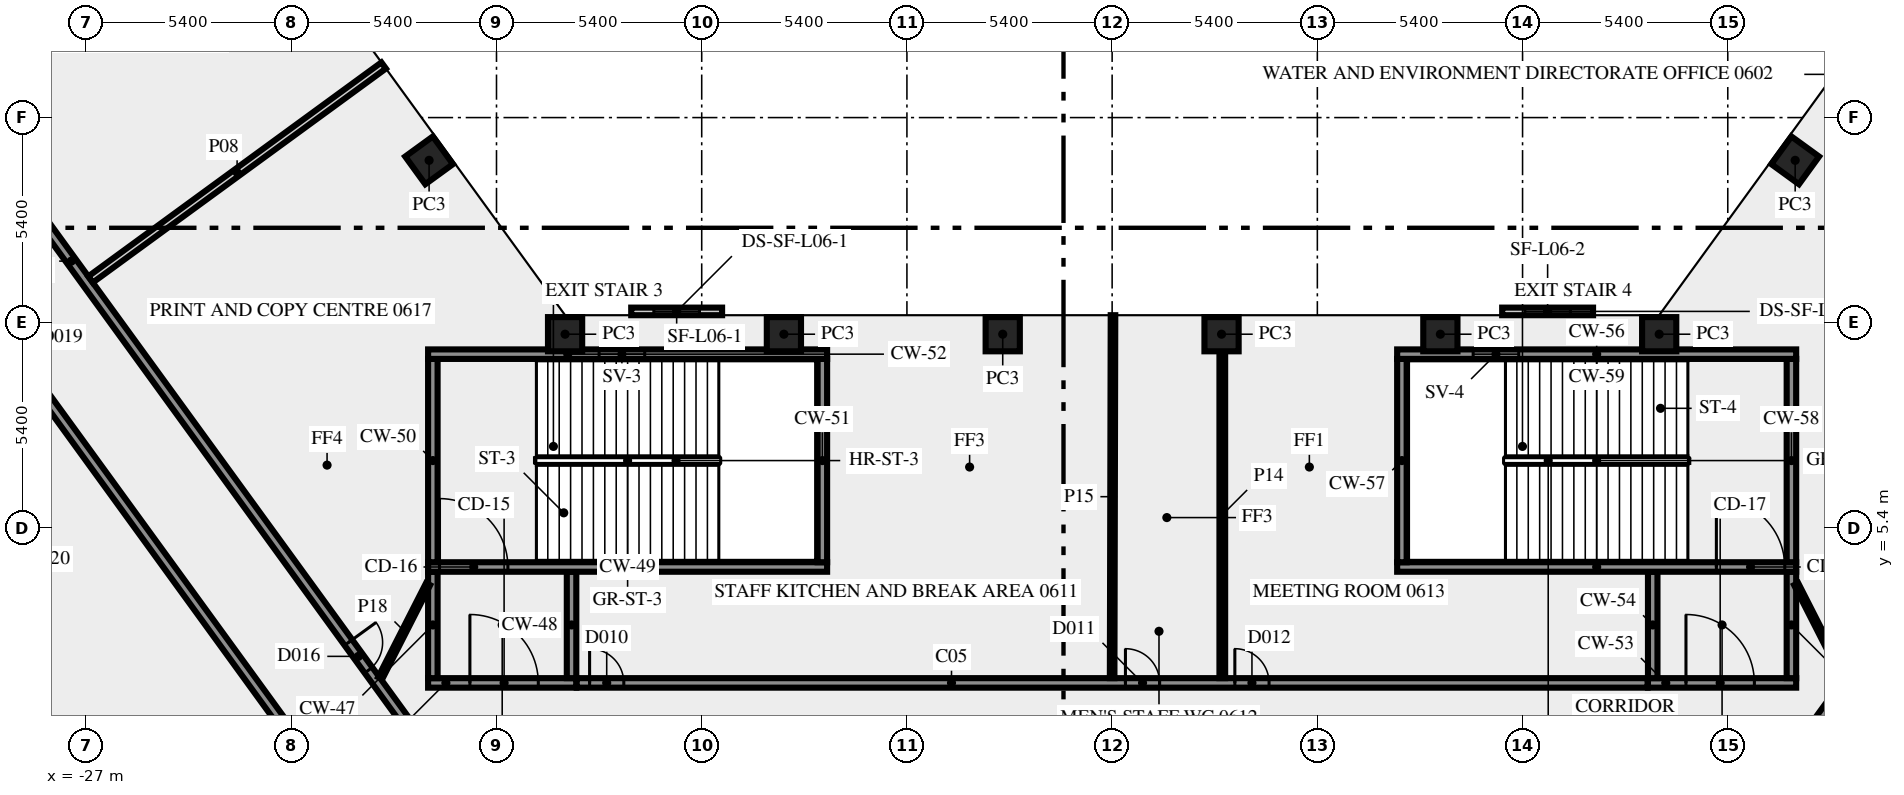
"""IFC4 building model, lengths in metres.
Left out: names, types, materials, properties, quantities, classifications, styles, units other than length and angle.
Written with IfcOpenShell. Run it as: python <this file> out.ifc"""

import sys

from ifc_helpers import new_model, si_unit, direction, frame, frame_2d, origin, origin_2d, place, context, subcontext, project, spatial, rectangle, extrude, element, fill, save


model = new_model("IFC4")
c1 = context("Model", 3, precision=1e-05, world=origin(), true_north=direction((0.0, 1.0)))
c2 = subcontext(c1, "Body", "Model", "MODEL_VIEW")
j1 = project(units=[si_unit("LENGTHUNIT", "METRE"), si_unit("PLANEANGLEUNIT", "RADIAN")], contexts=[c1])
p1 = place(None, origin())
s1 = spatial("IfcSite", under=j1, at=p1, CompositionType="ELEMENT")
p2 = place(p1, origin())
s2 = spatial("IfcBuilding", under=s1, at=p2, CompositionType="ELEMENT")
p3 = place(p2, frame((0.0, 0.0, 31.0)))
s3 = spatial("IfcBuildingStorey", under=s2, at=p3, CompositionType="ELEMENT", Elevation=31.0)
for number, where, z_axis, x_axis in (
    (1, (-17.974, 15.075, 0.0), (0.0, 0.0, 1.0), (-0.588, 0.809, 0.0)),
    (2, (17.974, 15.075, 0.0), (0.0, 0.0, 1.0), (-0.588, -0.809, 0.0)),
    (3, (14.395, 10.5, 0.0), (0.0, 0.0, 1.0), (-1.0, 0.0, 0.0)),
    (4, (8.637, 10.5, 0.0), (0.0, 0.0, 1.0), (-1.0, 0.0, 0.0)),
    (5, (2.879, 10.5, 0.0), (0.0, 0.0, 1.0), (-1.0, 0.0, 0.0)),
    (6, (-2.879, 10.5, 0.0), (0.0, 0.0, 1.0), (-1.0, 0.0, 0.0)),
    (7, (-8.637, 10.5, 0.0), (0.0, 0.0, 1.0), (-1.0, 0.0, 0.0)),
    (8, (-14.395, 10.5, 0.0), (0.0, 0.0, 1.0), (-1.0, 0.0, 0.0)),
):
    element("IfcColumn", number, at=place(p3, frame(where, z_axis=z_axis, x_axis=x_axis)), inside=s3, PredefinedType="COLUMN", context=c2, shape_type="SweptSolid", body=[
        extrude(rectangle(XDim=0.9, YDim=0.9, at=origin_2d()), origin(), (0.0, 0.0, 1.0), 3.65),
    ])
p4 = place(p3, frame((12.655, 11.1, 0.0), z_axis=(0.0, 0.0, 1.0), x_axis=(-1.0, 0.0, 0.0)))
e9 = element("IfcWall", 9, at=p4, inside=s3, PredefinedType="SOLIDWALL", context=c2, shape_type="SweptSolid", body=[
    extrude(rectangle(XDim=2.392, YDim=0.2, at=frame_2d((1.196, 0.0))), origin(), (0.0, 0.0, 1.0), 3.65),
])
p5 = place(p4, frame((0.596, 0.0, 1.0)))
e10 = element("IfcOpeningElement", 10, at=p5, cuts=e9, PredefinedType="OPENING", context=c2, shape_type="SweptSolid", body=[
    extrude(rectangle(XDim=1.2, YDim=1.2, at=frame_2d((0.6, 0.6))), frame((0.0, 0.11, 0.0), z_axis=(0.0, -1.0, 0.0), x_axis=(1.0, 0.0, 0.0)), (0.0, 0.0, 1.0), 0.22),
])
p6 = place(p3, frame((-10.263, 11.1, 0.0), z_axis=(0.0, 0.0, 1.0), x_axis=(-1.0, 0.0, 0.0)))
e11 = element("IfcWall", 11, at=p6, inside=s3, PredefinedType="SOLIDWALL", context=c2, shape_type="SweptSolid", body=[
    extrude(rectangle(XDim=2.392, YDim=0.2, at=frame_2d((1.196, 0.0))), origin(), (0.0, 0.0, 1.0), 3.65),
])
p7 = place(p6, frame((0.596, 0.0, 1.0)))
e12 = element("IfcOpeningElement", 12, at=p7, cuts=e11, PredefinedType="OPENING", context=c2, shape_type="SweptSolid", body=[
    extrude(rectangle(XDim=1.2, YDim=1.2, at=frame_2d((0.6, 0.6))), frame((0.0, 0.11, 0.0), z_axis=(0.0, -1.0, 0.0), x_axis=(1.0, 0.0, 0.0)), (0.0, 0.0, 1.0), 0.22),
])
p8 = place(p3, frame((-18.0, 1.325, 0.0), z_axis=(0.0, 0.0, 1.0), x_axis=(1.0, 0.0, 0.0)))
e13 = element("IfcWall", 13, at=p8, inside=s3, PredefinedType="SHEAR", context=c2, shape_type="SweptSolid", body=[
    extrude(rectangle(XDim=3.9, YDim=0.25, at=frame_2d((1.95, 0.0))), origin(), (0.0, 0.0, 1.0), 3.65),
])
p9 = place(p8, frame((1.1, 0.0, 0.0)))
e14 = element("IfcOpeningElement", 14, at=p9, cuts=e13, PredefinedType="OPENING", context=c2, shape_type="SweptSolid", body=[
    extrude(rectangle(XDim=1.8, YDim=2.1, at=frame_2d((0.9, 1.05))), frame((0.0, 0.135, 0.0), z_axis=(0.0, -1.0, 0.0), x_axis=(1.0, 0.0, 0.0)), (0.0, 0.0, 1.0), 0.27),
])
for number, where, z_axis, x_axis in (
    (15, (-17.875, 1.45, 0.0), (0.0, 0.0, 1.0), (0.0, 1.0, 0.0)),
    (16, (-14.225, 1.45, 0.0), (0.0, 0.0, 1.0), (0.0, 1.0, 0.0)),
):
    element("IfcWall", number, at=place(p3, frame(where, z_axis=z_axis, x_axis=x_axis)), inside=s3, PredefinedType="SHEAR", context=c2, shape_type="SweptSolid", body=[
        extrude(rectangle(XDim=2.8, YDim=0.25, at=frame_2d((1.4, 0.0))), origin(), (0.0, 0.0, 1.0), 3.65),
    ])
p10 = place(p3, frame((-18.0, 4.375, 0.0), z_axis=(0.0, 0.0, 1.0), x_axis=(1.0, 0.0, 0.0)))
e17 = element("IfcWall", 17, at=p10, inside=s3, PredefinedType="SHEAR", context=c2, shape_type="SweptSolid", body=[
    extrude(rectangle(XDim=10.5, YDim=0.25, at=frame_2d((5.25, 0.0))), origin(), (0.0, 0.0, 1.0), 3.65),
])
p11 = place(p10, frame((0.3, 0.0, 0.0)))
e18 = element("IfcOpeningElement", 18, at=p11, cuts=e17, PredefinedType="OPENING", context=c2, shape_type="SweptSolid", body=[
    extrude(rectangle(XDim=1.8, YDim=2.1, at=frame_2d((0.9, 1.05))), frame((0.0, 0.135, 0.0), z_axis=(0.0, -1.0, 0.0), x_axis=(1.0, 0.0, 0.0)), (0.0, 0.0, 1.0), 0.27),
])
for number, where, z_axis, x_axis in (
    (19, (-17.875, 4.5, 0.0), (0.0, 0.0, 1.0), (0.0, 1.0, 0.0)),
    (20, (-7.625, 4.5, 0.0), (0.0, 0.0, 1.0), (0.0, 1.0, 0.0)),
):
    element("IfcWall", number, at=place(p3, frame(where, z_axis=z_axis, x_axis=x_axis)), inside=s3, PredefinedType="SHEAR", context=c2, shape_type="SweptSolid", body=[
        extrude(rectangle(XDim=5.35, YDim=0.25, at=frame_2d((2.675, 0.0))), origin(), (0.0, 0.0, 1.0), 3.65),
    ])
p12 = place(p3, frame((-18.0, 9.975, 0.0), z_axis=(0.0, 0.0, 1.0), x_axis=(1.0, 0.0, 0.0)))
e21 = element("IfcWall", 21, at=p12, inside=s3, PredefinedType="SHEAR", context=c2, shape_type="SweptSolid", body=[
    extrude(rectangle(XDim=10.5, YDim=0.25, at=frame_2d((5.25, 0.0))), origin(), (0.0, 0.0, 1.0), 3.65),
])
p13 = place(p12, frame((4.5, 0.0, 1.0)))
e22 = element("IfcOpeningElement", 22, at=p13, cuts=e21, PredefinedType="OPENING", context=c2, shape_type="SweptSolid", body=[
    extrude(rectangle(XDim=1.2, YDim=1.2, at=frame_2d((0.6, 0.6))), frame((0.0, 0.135, 0.0), z_axis=(0.0, -1.0, 0.0), x_axis=(1.0, 0.0, 0.0)), (0.0, 0.0, 1.0), 0.27),
])
p14 = place(p3, frame((14.1, 1.325, 0.0), z_axis=(0.0, 0.0, 1.0), x_axis=(1.0, 0.0, 0.0)))
e23 = element("IfcWall", 23, at=p14, inside=s3, PredefinedType="SHEAR", context=c2, shape_type="SweptSolid", body=[
    extrude(rectangle(XDim=3.9, YDim=0.25, at=frame_2d((1.95, 0.0))), origin(), (0.0, 0.0, 1.0), 3.65),
])
p15 = place(p14, frame((1.0, 0.0, 0.0)))
e24 = element("IfcOpeningElement", 24, at=p15, cuts=e23, PredefinedType="OPENING", context=c2, shape_type="SweptSolid", body=[
    extrude(rectangle(XDim=1.8, YDim=2.1, at=frame_2d((0.9, 1.05))), frame((0.0, 0.135, 0.0), z_axis=(0.0, -1.0, 0.0), x_axis=(1.0, 0.0, 0.0)), (0.0, 0.0, 1.0), 0.27),
])
for number, where, z_axis, x_axis in (
    (25, (14.225, 1.45, 0.0), (0.0, 0.0, 1.0), (0.0, 1.0, 0.0)),
    (26, (17.875, 1.45, 0.0), (0.0, 0.0, 1.0), (0.0, 1.0, 0.0)),
):
    element("IfcWall", number, at=place(p3, frame(where, z_axis=z_axis, x_axis=x_axis)), inside=s3, PredefinedType="SHEAR", context=c2, shape_type="SweptSolid", body=[
        extrude(rectangle(XDim=2.8, YDim=0.25, at=frame_2d((1.4, 0.0))), origin(), (0.0, 0.0, 1.0), 3.65),
    ])
p16 = place(p3, frame((7.5, 4.375, 0.0), z_axis=(0.0, 0.0, 1.0), x_axis=(1.0, 0.0, 0.0)))
e27 = element("IfcWall", 27, at=p16, inside=s3, PredefinedType="SHEAR", context=c2, shape_type="SweptSolid", body=[
    extrude(rectangle(XDim=10.5, YDim=0.25, at=frame_2d((5.25, 0.0))), origin(), (0.0, 0.0, 1.0), 3.65),
])
p17 = place(p16, frame((8.4, 0.0, 0.0)))
e28 = element("IfcOpeningElement", 28, at=p17, cuts=e27, PredefinedType="OPENING", context=c2, shape_type="SweptSolid", body=[
    extrude(rectangle(XDim=1.8, YDim=2.1, at=frame_2d((0.9, 1.05))), frame((0.0, 0.135, 0.0), z_axis=(0.0, -1.0, 0.0), x_axis=(1.0, 0.0, 0.0)), (0.0, 0.0, 1.0), 0.27),
])
for number, where, z_axis, x_axis in (
    (29, (7.625, 4.5, 0.0), (0.0, 0.0, 1.0), (0.0, 1.0, 0.0)),
    (30, (17.875, 4.5, 0.0), (0.0, 0.0, 1.0), (0.0, 1.0, 0.0)),
):
    element("IfcWall", number, at=place(p3, frame(where, z_axis=z_axis, x_axis=x_axis)), inside=s3, PredefinedType="SHEAR", context=c2, shape_type="SweptSolid", body=[
        extrude(rectangle(XDim=5.35, YDim=0.25, at=frame_2d((2.675, 0.0))), origin(), (0.0, 0.0, 1.0), 3.65),
    ])
p18 = place(p3, frame((7.5, 9.975, 0.0), z_axis=(0.0, 0.0, 1.0), x_axis=(1.0, 0.0, 0.0)))
e31 = element("IfcWall", 31, at=p18, inside=s3, PredefinedType="SHEAR", context=c2, shape_type="SweptSolid", body=[
    extrude(rectangle(XDim=10.5, YDim=0.25, at=frame_2d((5.25, 0.0))), origin(), (0.0, 0.0, 1.0), 3.65),
])
p19 = place(p18, frame((2.0, 0.0, 1.0)))
e32 = element("IfcOpeningElement", 32, at=p19, cuts=e31, PredefinedType="OPENING", context=c2, shape_type="SweptSolid", body=[
    extrude(rectangle(XDim=1.2, YDim=1.2, at=frame_2d((0.6, 0.6))), frame((0.0, 0.135, 0.0), z_axis=(0.0, -1.0, 0.0), x_axis=(1.0, 0.0, 0.0)), (0.0, 0.0, 1.0), 0.27),
])
p20 = place(p3, frame((-20.531, -1.523, 0.0), z_axis=(0.0, 0.0, 1.0), x_axis=(-0.587784593204, 0.809017473231, 0.0)))
e33 = element("IfcWall", 33, at=p20, inside=s3, PredefinedType="SOLIDWALL", context=c2, shape_type="SweptSolid", body=[
    extrude(rectangle(XDim=44.67, YDim=0.25, at=frame_2d((22.335, 0.0))), origin(), (0.0, 0.0, 1.0), 3.65),
])
p21 = place(p20, frame((30.765, 0.0, 0.0)))
e34 = element("IfcOpeningElement", 34, at=p21, cuts=e33, PredefinedType="OPENING", context=c2, shape_type="SweptSolid", body=[
    extrude(rectangle(XDim=0.9, YDim=2.1, at=frame_2d((0.45, 1.05))), frame((0.0, 0.135, 0.0), z_axis=(0.0, -1.0, 0.0), x_axis=(1.0, 0.0, 0.0)), (0.0, 0.0, 1.0), 0.27),
])
p22 = place(p20, frame((14.316, 0.0, 0.0)))
e35 = element("IfcOpeningElement", 35, at=p22, cuts=e33, PredefinedType="OPENING", context=c2, shape_type="SweptSolid", body=[
    extrude(rectangle(XDim=0.9, YDim=2.1, at=frame_2d((0.45, 1.05))), frame((0.0, 0.135, 0.0), z_axis=(0.0, -1.0, 0.0), x_axis=(1.0, 0.0, 0.0)), (0.0, 0.0, 1.0), 0.27),
])
p23 = place(p20, frame((29.166, 0.0, 0.0)))
e36 = element("IfcOpeningElement", 36, at=p23, cuts=e33, PredefinedType="OPENING", context=c2, shape_type="SweptSolid", body=[
    extrude(rectangle(XDim=0.9, YDim=2.1, at=frame_2d((0.45, 1.05))), frame((0.0, 0.135, 0.0), z_axis=(0.0, -1.0, 0.0), x_axis=(1.0, 0.0, 0.0)), (0.0, 0.0, 1.0), 0.27),
])
p24 = place(p3, frame((-37.232, 25.972, 0.0), z_axis=(0.0, 0.0, 1.0), x_axis=(0.587786323093, -0.809016216391, 0.0)))
e37 = element("IfcWall", 37, at=p24, inside=s3, PredefinedType="SOLIDWALL", context=c2, shape_type="SweptSolid", body=[
    extrude(rectangle(XDim=33.493, YDim=0.25, at=frame_2d((16.747, 0.0))), origin(), (0.0, 0.0, 1.0), 3.65),
])
p25 = place(p24, frame((8.335, 0.0, 0.0)))
e38 = element("IfcOpeningElement", 38, at=p25, cuts=e37, PredefinedType="OPENING", context=c2, shape_type="SweptSolid", body=[
    extrude(rectangle(XDim=0.9, YDim=2.1, at=frame_2d((0.45, 1.05))), frame((0.0, 0.135, 0.0), z_axis=(0.0, -1.0, 0.0), x_axis=(1.0, 0.0, 0.0)), (0.0, 0.0, 1.0), 0.27),
])
p26 = place(p24, frame((29.152, 0.0, 0.0)))
e39 = element("IfcOpeningElement", 39, at=p26, cuts=e37, PredefinedType="OPENING", context=c2, shape_type="SweptSolid", body=[
    extrude(rectangle(XDim=0.9, YDim=2.1, at=frame_2d((0.45, 1.05))), frame((0.0, 0.135, 0.0), z_axis=(0.0, -1.0, 0.0), x_axis=(1.0, 0.0, 0.0)), (0.0, 0.0, 1.0), 0.27),
])
p27 = place(p24, frame((6.735, 0.0, 0.0)))
e40 = element("IfcOpeningElement", 40, at=p27, cuts=e37, PredefinedType="OPENING", context=c2, shape_type="SweptSolid", body=[
    extrude(rectangle(XDim=0.9, YDim=2.1, at=frame_2d((0.45, 1.05))), frame((0.0, 0.135, 0.0), z_axis=(0.0, -1.0, 0.0), x_axis=(1.0, 0.0, 0.0)), (0.0, 0.0, 1.0), 0.27),
])
p28 = place(p3, frame((-14.09, 1.325, 0.0), z_axis=(0.0, 0.0, 1.0), x_axis=(1.0, 0.0, 0.0)))
e41 = element("IfcWall", 41, at=p28, inside=s3, PredefinedType="SOLIDWALL", context=c2, shape_type="SweptSolid", body=[
    extrude(rectangle(XDim=28.18, YDim=0.25, at=frame_2d((14.09, 0.0))), origin(), (0.0, 0.0, 1.0), 3.65),
])
p29 = place(p28, frame((17.319, 0.0, 0.0)))
e42 = element("IfcOpeningElement", 42, at=p29, cuts=e41, PredefinedType="OPENING", context=c2, shape_type="SweptSolid", body=[
    extrude(rectangle(XDim=0.9, YDim=2.1, at=frame_2d((0.45, 1.05))), frame((0.0, 0.135, 0.0), z_axis=(0.0, -1.0, 0.0), x_axis=(1.0, 0.0, 0.0)), (0.0, 0.0, 1.0), 0.27),
])
p30 = place(p28, frame((14.44, 0.0, 0.0)))
e43 = element("IfcOpeningElement", 43, at=p30, cuts=e41, PredefinedType="OPENING", context=c2, shape_type="SweptSolid", body=[
    extrude(rectangle(XDim=0.9, YDim=2.1, at=frame_2d((0.45, 1.05))), frame((0.0, 0.135, 0.0), z_axis=(0.0, -1.0, 0.0), x_axis=(1.0, 0.0, 0.0)), (0.0, 0.0, 1.0), 0.27),
])
p31 = place(p28, frame((0.34, 0.0, 0.0)))
e44 = element("IfcOpeningElement", 44, at=p31, cuts=e41, PredefinedType="OPENING", context=c2, shape_type="SweptSolid", body=[
    extrude(rectangle(XDim=0.9, YDim=2.1, at=frame_2d((0.45, 1.05))), frame((0.0, 0.135, 0.0), z_axis=(0.0, -1.0, 0.0), x_axis=(1.0, 0.0, 0.0)), (0.0, 0.0, 1.0), 0.27),
])
p32 = place(p3, frame((17.545, -1.125, 0.0), z_axis=(0.0, 0.0, 1.0), x_axis=(0.587786323093, 0.809016216391, 0.0)))
e45 = element("IfcWall", 45, at=p32, inside=s3, PredefinedType="SOLIDWALL", context=c2, shape_type="SweptSolid", body=[
    extrude(rectangle(XDim=33.493, YDim=0.25, at=frame_2d((16.747, 0.0))), origin(), (0.0, 0.0, 1.0), 3.65),
])
p33 = place(p32, frame((25.857, 0.0, 0.0)))
e46 = element("IfcOpeningElement", 46, at=p33, cuts=e45, PredefinedType="OPENING", context=c2, shape_type="SweptSolid", body=[
    extrude(rectangle(XDim=0.9, YDim=2.1, at=frame_2d((0.45, 1.05))), frame((0.0, 0.135, 0.0), z_axis=(0.0, -1.0, 0.0), x_axis=(1.0, 0.0, 0.0)), (0.0, 0.0, 1.0), 0.27),
])
p34 = place(p32, frame((24.157, 0.0, 0.0)))
e47 = element("IfcOpeningElement", 47, at=p34, cuts=e45, PredefinedType="OPENING", context=c2, shape_type="SweptSolid", body=[
    extrude(rectangle(XDim=1.0, YDim=2.1, at=frame_2d((0.5, 1.05))), frame((0.0, 0.135, 0.0), z_axis=(0.0, -1.0, 0.0), x_axis=(1.0, 0.0, 0.0)), (0.0, 0.0, 1.0), 0.27),
])
p35 = place(p3, frame((-26.882, 11.94, 0.0), z_axis=(0.0, 0.0, 1.0), x_axis=(0.807664588563, 0.589642190131, 0.0)))
e48 = element("IfcWall", 48, at=p35, inside=s3, PredefinedType="SOLIDWALL", context=c2, shape_type="SweptSolid", body=[
    extrude(rectangle(XDim=9.55, YDim=0.2, at=frame_2d((4.775, 0.0))), origin(), (0.0, 0.0, 1.0), 2.75),
])
p36 = place(p3, frame((2.899, 10.045, 0.0), z_axis=(0.0, 0.0, 1.0), x_axis=(0.0, -1.0, 0.0)))
e49 = element("IfcWall", 49, at=p36, inside=s3, PredefinedType="PARTITIONING", context=c2, shape_type="SweptSolid", body=[
    extrude(rectangle(XDim=8.595, YDim=0.15, at=frame_2d((4.297, 0.0))), origin(), (0.0, 0.0, 1.0), 3.65),
])
p37 = place(p3, frame((0.023, 11.0, 0.0), z_axis=(0.0, 0.0, 1.0), x_axis=(-0.002377476217, -0.999997173799, 0.0)))
e50 = element("IfcWall", 50, at=p37, inside=s3, PredefinedType="PARTITIONING", context=c2, shape_type="SweptSolid", body=[
    extrude(rectangle(XDim=9.55, YDim=0.12, at=frame_2d((4.775, 0.0))), origin(), (0.0, 0.0, 1.0), 2.75),
])
for number, where, z_axis, x_axis in (
    (51, (18.0, 3.925, 0.0), (0.0, 0.0, 1.0), (0.454, -0.891, 0.0)),
    (52, (-19.261, 1.45, 0.0), (0.0, 0.0, 1.0), (0.454, 0.891, 0.0)),
):
    element("IfcWall", number, at=place(p3, frame(where, z_axis=z_axis, x_axis=x_axis)), inside=s3, PredefinedType="PARTITIONING", context=c2, shape_type="SweptSolid", body=[
        extrude(rectangle(XDim=2.778, YDim=0.12, at=frame_2d((1.389, 0.0))), origin(), (0.0, 0.0, 1.0), 3.65),
    ])
p38 = place(p5, origin())
e53 = element("IfcWindow", 53, at=p38, inside=s3, PartitioningType="SINGLE_PANEL", PredefinedType="WINDOW", context=c2, shape_type="SweptSolid", body=[
    extrude(rectangle(XDim=1.2, YDim=1.2, at=frame_2d((0.6, 0.6))), frame((0.0, 0.03, 0.0), z_axis=(0.0, -1.0, 0.0), x_axis=(1.0, 0.0, 0.0)), (0.0, 0.0, 1.0), 0.06),
])
fill(e10, e53)
p39 = place(p7, origin())
e54 = element("IfcWindow", 54, at=p39, inside=s3, PartitioningType="SINGLE_PANEL", PredefinedType="WINDOW", context=c2, shape_type="SweptSolid", body=[
    extrude(rectangle(XDim=1.2, YDim=1.2, at=frame_2d((0.6, 0.6))), frame((0.0, 0.03, 0.0), z_axis=(0.0, -1.0, 0.0), x_axis=(1.0, 0.0, 0.0)), (0.0, 0.0, 1.0), 0.06),
])
fill(e12, e54)
p40 = place(p9, origin())
e55 = element("IfcDoor", 55, at=p40, inside=s3, OperationType="DOUBLE_DOOR_SINGLE_SWING", PredefinedType="DOOR", context=c2, shape_type="SweptSolid", body=[
    extrude(rectangle(XDim=1.8, YDim=2.1, at=frame_2d((0.9, 1.05))), frame((0.0, 0.025, 0.0), z_axis=(0.0, -1.0, 0.0), x_axis=(1.0, 0.0, 0.0)), (0.0, 0.0, 1.0), 0.05),
])
fill(e14, e55)
p41 = place(p11, origin())
e56 = element("IfcDoor", 56, at=p41, inside=s3, OperationType="DOUBLE_DOOR_SINGLE_SWING", PredefinedType="DOOR", context=c2, shape_type="SweptSolid", body=[
    extrude(rectangle(XDim=1.8, YDim=2.1, at=frame_2d((0.9, 1.05))), frame((0.0, 0.025, 0.0), z_axis=(0.0, -1.0, 0.0), x_axis=(1.0, 0.0, 0.0)), (0.0, 0.0, 1.0), 0.05),
])
fill(e18, e56)
p42 = place(p13, origin())
e57 = element("IfcWindow", 57, at=p42, inside=s3, PartitioningType="SINGLE_PANEL", PredefinedType="WINDOW", context=c2, shape_type="SweptSolid", body=[
    extrude(rectangle(XDim=1.2, YDim=1.2, at=frame_2d((0.6, 0.6))), frame((0.0, 0.03, 0.0), z_axis=(0.0, -1.0, 0.0), x_axis=(1.0, 0.0, 0.0)), (0.0, 0.0, 1.0), 0.06),
])
fill(e22, e57)
p43 = place(p15, origin())
e58 = element("IfcDoor", 58, at=p43, inside=s3, OperationType="DOUBLE_DOOR_SINGLE_SWING", PredefinedType="DOOR", context=c2, shape_type="SweptSolid", body=[
    extrude(rectangle(XDim=1.8, YDim=2.1, at=frame_2d((0.9, 1.05))), frame((0.0, 0.025, 0.0), z_axis=(0.0, -1.0, 0.0), x_axis=(1.0, 0.0, 0.0)), (0.0, 0.0, 1.0), 0.05),
])
fill(e24, e58)
p44 = place(p17, origin())
e59 = element("IfcDoor", 59, at=p44, inside=s3, OperationType="DOUBLE_DOOR_SINGLE_SWING", PredefinedType="DOOR", context=c2, shape_type="SweptSolid", body=[
    extrude(rectangle(XDim=1.8, YDim=2.1, at=frame_2d((0.9, 1.05))), frame((0.0, 0.025, 0.0), z_axis=(0.0, -1.0, 0.0), x_axis=(1.0, 0.0, 0.0)), (0.0, 0.0, 1.0), 0.05),
])
fill(e28, e59)
p45 = place(p19, origin())
e60 = element("IfcWindow", 60, at=p45, inside=s3, PartitioningType="SINGLE_PANEL", PredefinedType="WINDOW", context=c2, shape_type="SweptSolid", body=[
    extrude(rectangle(XDim=1.2, YDim=1.2, at=frame_2d((0.6, 0.6))), frame((0.0, 0.03, 0.0), z_axis=(0.0, -1.0, 0.0), x_axis=(1.0, 0.0, 0.0)), (0.0, 0.0, 1.0), 0.06),
])
fill(e32, e60)
p46 = place(p29, origin())
e61 = element("IfcDoor", 61, at=p46, inside=s3, OperationType="SINGLE_SWING_LEFT", PredefinedType="DOOR", context=c2, shape_type="SweptSolid", body=[
    extrude(rectangle(XDim=0.9, YDim=2.1, at=frame_2d((0.45, 1.05))), frame((0.0, 0.025, 0.0), z_axis=(0.0, -1.0, 0.0), x_axis=(1.0, 0.0, 0.0)), (0.0, 0.0, 1.0), 0.05),
])
fill(e42, e61)
p47 = place(p30, origin())
e62 = element("IfcDoor", 62, at=p47, inside=s3, OperationType="SINGLE_SWING_LEFT", PredefinedType="DOOR", context=c2, shape_type="SweptSolid", body=[
    extrude(rectangle(XDim=0.9, YDim=2.1, at=frame_2d((0.45, 1.05))), frame((0.0, 0.025, 0.0), z_axis=(0.0, -1.0, 0.0), x_axis=(1.0, 0.0, 0.0)), (0.0, 0.0, 1.0), 0.05),
])
fill(e43, e62)
p48 = place(p26, origin())
e63 = element("IfcDoor", 63, at=p48, inside=s3, OperationType="SINGLE_SWING_RIGHT", PredefinedType="DOOR", context=c2, shape_type="SweptSolid", body=[
    extrude(rectangle(XDim=0.9, YDim=2.1, at=frame_2d((0.45, 1.05))), frame((0.0, 0.025, 0.0), z_axis=(0.0, -1.0, 0.0), x_axis=(1.0, 0.0, 0.0)), (0.0, 0.0, 1.0), 0.05),
])
fill(e39, e63)
p49 = place(p31, origin())
e64 = element("IfcDoor", 64, at=p49, inside=s3, OperationType="SINGLE_SWING_LEFT", PredefinedType="DOOR", context=c2, shape_type="SweptSolid", body=[
    extrude(rectangle(XDim=0.9, YDim=2.1, at=frame_2d((0.45, 1.05))), frame((0.0, 0.025, 0.0), z_axis=(0.0, -1.0, 0.0), x_axis=(1.0, 0.0, 0.0)), (0.0, 0.0, 1.0), 0.05),
])
fill(e44, e64)
save(model, sys.argv[1])
